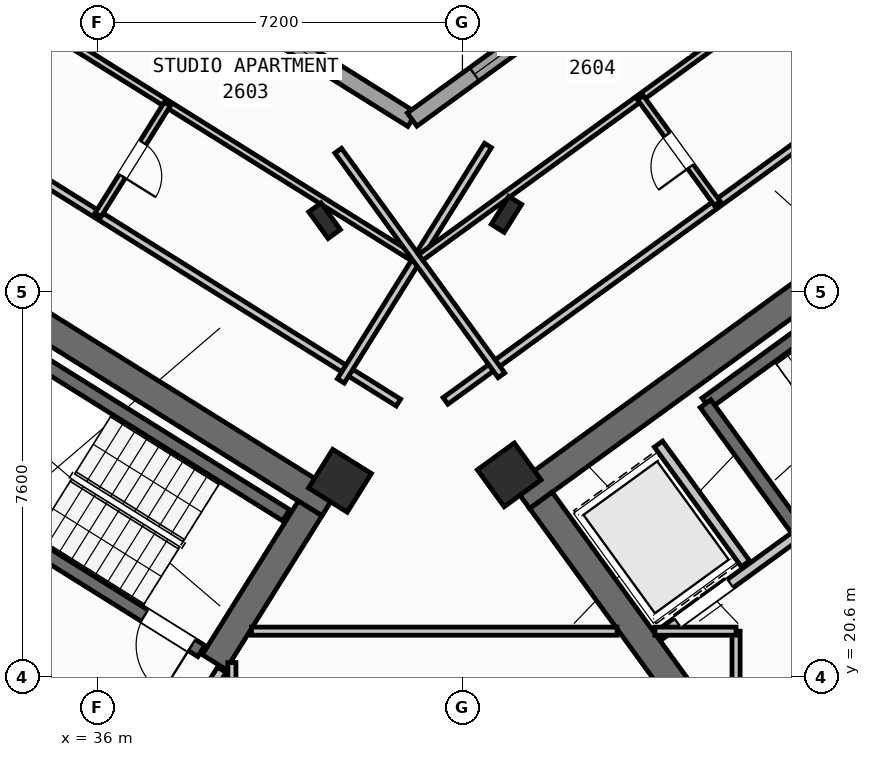
"""IFC4 building model, lengths in metres.
Left out: names, types, materials, properties, quantities, classifications, styles, units other than length and angle.
Written with IfcOpenShell. Run it as: python <this file> out.ifc"""

import sys

from ifc_helpers import new_model, si_unit, direction, frame, frame_2d, origin, origin_2d, place, context, subcontext, project, spatial, rectangle, hollow_rectangle, i_section, extrude, source, transform, mapped, element, fill, save


model = new_model("IFC4")
c1 = context("Model", 3, precision=1e-05, world=origin(), true_north=direction((0.0, 1.0)))
c2 = subcontext(c1, "Body", "Model", "MODEL_VIEW")
j1 = project(units=[si_unit("LENGTHUNIT", "METRE"), si_unit("PLANEANGLEUNIT", "RADIAN")], contexts=[c1])
p1 = place(None, origin())
s1 = spatial("IfcSite", under=j1, at=p1, CompositionType="ELEMENT")
p2 = place(p1, origin())
s2 = spatial("IfcBuilding", under=s1, at=p2, CompositionType="ELEMENT")
p3 = place(p2, frame((0.0, 0.0, 105.3)))
s3 = spatial("IfcBuildingStorey", under=s2, at=p3, CompositionType="ELEMENT", Elevation=105.3)
p4 = place(p3, frame((40.573, 24.01, 0.0), z_axis=(0.0, 0.0, 1.0), x_axis=(-0.848047359947, 0.529920442413, 0.0)))
e1 = element("IfcWall", 1, at=p4, inside=s3, PredefinedType="SHEAR", context=c2, shape_type="SweptSolid", body=[
    extrude(rectangle(XDim=13.14, YDim=0.55, at=frame_2d((6.57, 0.0))), origin(), (0.0, 0.0, 1.0), 3.35),
])
p5 = place(p3, frame((40.194, 23.922, 0.0), z_axis=(0.0, 0.0, 1.0), x_axis=(-0.529888438328, -0.848067357541, 0.0)))
e2 = element("IfcWall", 2, at=p5, inside=s3, PredefinedType="SHEAR", context=c2, shape_type="SweptSolid", body=[
    extrude(rectangle(XDim=3.575, YDim=0.55, at=frame_2d((1.788, 0.0))), origin(), (0.0, 0.0, 1.0), 3.35),
])
p6 = place(p3, frame((44.365, 24.142, 0.0), z_axis=(0.0, 0.0, 1.0), x_axis=(0.809024304885, 0.587775190107, 0.0)))
e3 = element("IfcWall", 3, at=p6, inside=s3, PredefinedType="SHEAR", context=c2, shape_type="SweptSolid", body=[
    extrude(rectangle(XDim=12.34, YDim=0.55, at=frame_2d((6.17, 0.0))), origin(), (0.0, 0.0, 1.0), 3.35),
])
p7 = place(p3, frame((48.526, 18.884, 0.0), z_axis=(0.0, 0.0, 1.0), x_axis=(-0.587764933797, 0.809031756236, 0.0)))
e4 = element("IfcWall", 4, at=p7, inside=s3, PredefinedType="SHEAR", context=c2, shape_type="SweptSolid", body=[
    extrude(rectangle(XDim=6.425, YDim=0.55, at=frame_2d((3.212, 0.0))), origin(), (0.0, 0.0, 1.0), 3.35),
])
m1 = source(origin(), c2, "Body", "SweptSolid", [
    extrude(i_section(OverallWidth=0.3, OverallDepth=0.65, WebThickness=0.016, FlangeThickness=0.031, at=origin_2d()), origin(), (0.0, 0.0, 1.0), 3.6),
])
p8 = place(p3, frame((44.068, 29.726, 0.0), z_axis=(0.0, 0.0, 1.0), x_axis=(-0.848048096156, 0.529919264233, 0.0)))
e5 = element("IfcColumn", 5, at=p8, inside=s3, PredefinedType="COLUMN", context=c2, shape_type="MappedRepresentation", body=[
    mapped(m1, transform((0.0, 0.0, 0.0), scale=1.0)),
])
m2 = source(origin(), c2, "Body", "SweptSolid", [
    extrude(hollow_rectangle(XDim=0.9, YDim=0.9, WallThickness=0.036, at=origin_2d()), origin(), (0.0, 0.0, 1.0), 3.6),
])
for number, where, z_axis, x_axis in (
    (6, (40.783, 24.469, 0.0), (0.0, 0.0, 1.0), (-0.848, 0.53, 0.0)),
    (7, (44.124, 24.585, 0.0), (0.0, 0.0, 1.0), (0.809, 0.588, 0.0)),
):
    element("IfcColumn", number, at=place(p3, frame(where, z_axis=z_axis, x_axis=x_axis)), inside=s3, PredefinedType="COLUMN", context=c2, shape_type="MappedRepresentation", body=[
        mapped(m2, transform((0.0, 0.0, 0.0), scale=1.0)),
    ])
p9 = place(p3, frame((40.479, 29.601, 0.0), z_axis=(0.0, 0.0, 1.0), x_axis=(0.809016994375, 0.587785252292, 0.0)))
e8 = element("IfcColumn", 8, at=p9, inside=s3, PredefinedType="COLUMN", context=c2, shape_type="MappedRepresentation", body=[
    mapped(m1, transform((0.0, 0.0, 0.0), scale=1.0)),
])
p10 = place(p3, frame((17.424, 47.083, 0.0), z_axis=(0.0, 0.0, 1.0), x_axis=(0.848049927979, -0.529916332693, 0.0)))
e9 = element("IfcWall", 9, at=p10, inside=s3, PredefinedType="STANDARD", context=c2, shape_type="SweptSolid", body=[
    extrude(rectangle(XDim=29.223, YDim=0.32, at=frame_2d((14.612, 0.0))), origin(), (0.0, 0.0, 1.0), 3.35),
])
p11 = place(p10, frame((3.709, 0.0, 0.0)))
e10 = element("IfcOpeningElement", 10, at=p11, cuts=e9, PredefinedType="OPENING", context=c2, shape_type="SweptSolid", body=[
    extrude(rectangle(XDim=1.05, YDim=2.15, at=frame_2d((0.525, 1.075))), frame((0.0, 0.17, 0.0), z_axis=(0.0, -1.0, 0.0), x_axis=(1.0, 0.0, 0.0)), (0.0, 0.0, 1.0), 0.34),
])
p12 = place(p10, frame((0.659, 0.0, 0.95)))
e11 = element("IfcOpeningElement", 11, at=p12, cuts=e9, PredefinedType="OPENING", context=c2, shape_type="SweptSolid", body=[
    extrude(rectangle(XDim=1.2, YDim=1.4, at=frame_2d((0.6, 0.7))), frame((0.0, 0.17, 0.0), z_axis=(0.0, -1.0, 0.0), x_axis=(1.0, 0.0, 0.0)), (0.0, 0.0, 1.0), 0.34),
])
p13 = place(p10, frame((6.972, 0.0, 1.0)))
e12 = element("IfcOpeningElement", 12, at=p13, cuts=e9, PredefinedType="OPENING", context=c2, shape_type="SweptSolid", body=[
    extrude(rectangle(XDim=0.9, YDim=1.25, at=frame_2d((0.45, 0.625))), frame((0.0, 0.17, 0.0), z_axis=(0.0, -1.0, 0.0), x_axis=(1.0, 0.0, 0.0)), (0.0, 0.0, 1.0), 0.34),
])
p14 = place(p10, frame((9.847, 0.0, 0.85)))
e13 = element("IfcOpeningElement", 13, at=p14, cuts=e9, PredefinedType="OPENING", context=c2, shape_type="SweptSolid", body=[
    extrude(rectangle(XDim=1.5, YDim=1.5, at=frame_2d((0.75, 0.75))), frame((0.0, 0.17, 0.0), z_axis=(0.0, -1.0, 0.0), x_axis=(1.0, 0.0, 0.0)), (0.0, 0.0, 1.0), 0.34),
])
p15 = place(p10, frame((13.889, 0.0, 0.95)))
e14 = element("IfcOpeningElement", 14, at=p15, cuts=e9, PredefinedType="OPENING", context=c2, shape_type="SweptSolid", body=[
    extrude(rectangle(XDim=1.2, YDim=1.4, at=frame_2d((0.6, 0.7))), frame((0.0, 0.17, 0.0), z_axis=(0.0, -1.0, 0.0), x_axis=(1.0, 0.0, 0.0)), (0.0, 0.0, 1.0), 0.34),
])
p16 = place(p10, frame((17.254, 0.0, 1.0)))
e15 = element("IfcOpeningElement", 15, at=p16, cuts=e9, PredefinedType="OPENING", context=c2, shape_type="SweptSolid", body=[
    extrude(rectangle(XDim=0.9, YDim=1.25, at=frame_2d((0.45, 0.625))), frame((0.0, 0.17, 0.0), z_axis=(0.0, -1.0, 0.0), x_axis=(1.0, 0.0, 0.0)), (0.0, 0.0, 1.0), 0.34),
])
p17 = place(p10, frame((20.764, 0.0, 0.8)))
e16 = element("IfcOpeningElement", 16, at=p17, cuts=e9, PredefinedType="OPENING", context=c2, shape_type="SweptSolid", body=[
    extrude(rectangle(XDim=2.1, YDim=1.55, at=frame_2d((1.05, 0.775))), frame((0.0, 0.17, 0.0), z_axis=(0.0, -1.0, 0.0), x_axis=(1.0, 0.0, 0.0)), (0.0, 0.0, 1.0), 0.34),
])
p18 = place(p10, frame((25.403, 0.0, 0.8)))
e17 = element("IfcOpeningElement", 17, at=p18, cuts=e9, PredefinedType="OPENING", context=c2, shape_type="SweptSolid", body=[
    extrude(rectangle(XDim=2.1, YDim=1.55, at=frame_2d((1.05, 0.775))), frame((0.0, 0.17, 0.0), z_axis=(0.0, -1.0, 0.0), x_axis=(1.0, 0.0, 0.0)), (0.0, 0.0, 1.0), 0.34),
])
p19 = place(p3, frame((42.207, 31.597, 0.0), z_axis=(0.0, 0.0, 1.0), x_axis=(0.809020333377, 0.587780656523, 0.0)))
e18 = element("IfcWall", 18, at=p19, inside=s3, PredefinedType="STANDARD", context=c2, shape_type="SweptSolid", body=[
    extrude(rectangle(XDim=15.223, YDim=0.32, at=frame_2d((7.611, 0.0))), origin(), (0.0, 0.0, 1.0), 3.35),
])
p20 = place(p19, frame((12.82, 0.0, 0.0)))
e19 = element("IfcOpeningElement", 19, at=p20, cuts=e18, PredefinedType="OPENING", context=c2, shape_type="SweptSolid", body=[
    extrude(rectangle(XDim=1.05, YDim=2.15, at=frame_2d((0.525, 1.075))), frame((0.0, 0.17, 0.0), z_axis=(0.0, -1.0, 0.0), x_axis=(1.0, 0.0, 0.0)), (0.0, 0.0, 1.0), 0.34),
])
p21 = place(p19, frame((1.52, 0.0, 0.8)))
e20 = element("IfcOpeningElement", 20, at=p21, cuts=e18, PredefinedType="OPENING", context=c2, shape_type="SweptSolid", body=[
    extrude(rectangle(XDim=2.1, YDim=1.55, at=frame_2d((1.05, 0.775))), frame((0.0, 0.17, 0.0), z_axis=(0.0, -1.0, 0.0), x_axis=(1.0, 0.0, 0.0)), (0.0, 0.0, 1.0), 0.34),
])
p22 = place(p19, frame((5.76, 0.0, 0.8)))
e21 = element("IfcOpeningElement", 21, at=p22, cuts=e18, PredefinedType="OPENING", context=c2, shape_type="SweptSolid", body=[
    extrude(rectangle(XDim=2.1, YDim=1.55, at=frame_2d((1.05, 0.775))), frame((0.0, 0.17, 0.0), z_axis=(0.0, -1.0, 0.0), x_axis=(1.0, 0.0, 0.0)), (0.0, 0.0, 1.0), 0.34),
])
p23 = place(p19, frame((10.219, 0.0, 1.0)))
e22 = element("IfcOpeningElement", 22, at=p23, cuts=e18, PredefinedType="OPENING", context=c2, shape_type="SweptSolid", body=[
    extrude(rectangle(XDim=0.9, YDim=1.25, at=frame_2d((0.45, 0.625))), frame((0.0, 0.17, 0.0), z_axis=(0.0, -1.0, 0.0), x_axis=(1.0, 0.0, 0.0)), (0.0, 0.0, 1.0), 0.34),
])
p24 = place(p3, frame((39.721, 23.788, 0.0), z_axis=(0.0, 0.0, 1.0), x_axis=(-0.848054434086, 0.529909121291, 0.0)))
e23 = element("IfcWall", 23, at=p24, inside=s3, PredefinedType="SHEAR", context=c2, shape_type="SweptSolid", body=[
    extrude(rectangle(XDim=7.33, YDim=0.26, at=frame_2d((3.665, 0.0))), origin(), (0.0, 0.0, 1.0), 3.35),
])
p25 = place(p3, frame((38.046, 21.108, 0.0), z_axis=(0.0, 0.0, 1.0), x_axis=(-0.848054434086, 0.529909121291, 0.0)))
e24 = element("IfcWall", 24, at=p25, inside=s3, PredefinedType="SHEAR", context=c2, shape_type="SweptSolid", body=[
    extrude(rectangle(XDim=7.33, YDim=0.26, at=frame_2d((3.665, 0.0))), origin(), (0.0, 0.0, 1.0), 3.35),
])
p26 = place(p25, frame((0.22, 0.0, 0.0)))
e25 = element("IfcOpeningElement", 25, at=p26, cuts=e24, PredefinedType="OPENING", context=c2, shape_type="SweptSolid", body=[
    extrude(rectangle(XDim=1.1, YDim=2.1, at=frame_2d((0.55, 1.05))), frame((0.0, 0.14, 0.0), z_axis=(0.0, -1.0, 0.0), x_axis=(1.0, 0.0, 0.0)), (0.0, 0.0, 1.0), 0.28),
])
p27 = place(p3, frame((36.417, 18.447, 0.0), z_axis=(0.0, 0.0, 1.0), x_axis=(-0.848064879198, 0.529892404805, 0.0)))
e26 = element("IfcWall", 26, at=p27, inside=s3, PredefinedType="STANDARD", context=c2, shape_type="SweptSolid", body=[
    extrude(rectangle(XDim=5.768, YDim=0.2, at=frame_2d((2.884, 0.0))), origin(), (0.0, 0.0, 1.0), 3.34),
])
p28 = place(p27, frame((2.548, 0.0, 0.0)))
e27 = element("IfcOpeningElement", 27, at=p28, cuts=e26, PredefinedType="OPENING", context=c2, shape_type="SweptSolid", body=[
    extrude(rectangle(XDim=1.15, YDim=2.1, at=frame_2d((0.575, 1.05))), frame((0.0, 0.11, 0.0), z_axis=(0.0, -1.0, 0.0), x_axis=(1.0, 0.0, 0.0)), (0.0, 0.0, 1.0), 0.22),
])
p29 = place(p3, frame((48.006, 25.996, 0.0), z_axis=(0.0, 0.0, 1.0), x_axis=(0.80901903764, 0.587782439969, 0.0)))
e28 = element("IfcWall", 28, at=p29, inside=s3, PredefinedType="SHEAR", context=c2, shape_type="SweptSolid", body=[
    extrude(rectangle(XDim=7.46, YDim=0.26, at=frame_2d((3.73, 0.0))), origin(), (0.0, 0.0, 1.0), 3.35),
])
p30 = place(p3, frame((49.855, 23.434, 0.0), z_axis=(0.0, 0.0, 1.0), x_axis=(-0.58776738483, 0.809029975545, 0.0)))
e29 = element("IfcWall", 29, at=p30, inside=s3, PredefinedType="SHEAR", context=c2, shape_type="SweptSolid", body=[
    extrude(rectangle(XDim=3.16, YDim=0.26, at=frame_2d((1.58, 0.0))), origin(), (0.0, 0.0, 1.0), 3.35),
])
p31 = place(p3, frame((47.065, 21.407, 0.0), z_axis=(0.0, 0.0, 1.0), x_axis=(0.809032984992, 0.587763242466, 0.0)))
e30 = element("IfcWall", 30, at=p31, inside=s3, PredefinedType="STANDARD", context=c2, shape_type="SweptSolid", body=[
    extrude(rectangle(XDim=3.448, YDim=0.2, at=frame_2d((1.724, 0.0))), origin(), (0.0, 0.0, 1.0), 3.34),
])
p32 = place(p31, frame((0.458, 0.0, 0.0)))
e31 = element("IfcOpeningElement", 31, at=p32, cuts=e30, PredefinedType="OPENING", context=c2, shape_type="SweptSolid", body=[
    extrude(rectangle(XDim=1.3, YDim=2.2, at=frame_2d((0.65, 1.1))), frame((0.0, 0.11, 0.0), z_axis=(0.0, -1.0, 0.0), x_axis=(1.0, 0.0, 0.0)), (0.0, 0.0, 1.0), 0.22),
])
p33 = place(p3, frame((48.758, 19.077, 0.0), z_axis=(0.0, 0.0, 1.0), x_axis=(0.809005065155, 0.587801671104, 0.0)))
e32 = element("IfcWall", 32, at=p33, inside=s3, PredefinedType="STANDARD", context=c2, shape_type="SweptSolid", body=[
    extrude(rectangle(XDim=5.768, YDim=0.2, at=frame_2d((2.884, 0.0))), origin(), (0.0, 0.0, 1.0), 3.34),
])
p34 = place(p33, frame((2.548, 0.0, 0.0)))
e33 = element("IfcOpeningElement", 33, at=p34, cuts=e32, PredefinedType="OPENING", context=c2, shape_type="SweptSolid", body=[
    extrude(rectangle(XDim=1.15, YDim=2.1, at=frame_2d((0.575, 1.05))), frame((0.0, 0.11, 0.0), z_axis=(0.0, -1.0, 0.0), x_axis=(1.0, 0.0, 0.0)), (0.0, 0.0, 1.0), 0.22),
])
p35 = place(p3, frame((48.786, 22.83, 0.0), z_axis=(0.0, 0.0, 1.0), x_axis=(-0.587783856777, 0.809018008275, 0.0)))
e34 = element("IfcWall", 34, at=p35, inside=s3, PredefinedType="STANDARD", context=c2, shape_type="SweptSolid", body=[
    extrude(rectangle(XDim=2.92, YDim=0.2, at=frame_2d((1.46, 0.0))), origin(), (0.0, 0.0, 1.0), 3.34),
])
p36 = place(p3, frame((41.936, 26.012, 0.0), z_axis=(0.0, 0.0, 1.0), x_axis=(-0.848051154596, 0.529914369676, 0.0)))
e35 = element("IfcWall", 35, at=p36, inside=s3, PredefinedType="PARTITIONING", context=c2, shape_type="SweptSolid", body=[
    extrude(rectangle(XDim=15.57, YDim=0.16, at=frame_2d((7.785, 0.0))), origin(), (0.0, 0.0, 1.0), 3.34),
])
p37 = place(p36, frame((10.83, 0.0, 0.0)))
e36 = element("IfcOpeningElement", 36, at=p37, cuts=e35, PredefinedType="OPENING", context=c2, shape_type="SweptSolid", body=[
    extrude(rectangle(XDim=1.0, YDim=2.1, at=frame_2d((0.5, 1.05))), frame((0.0, 0.09, 0.0), z_axis=(0.0, -1.0, 0.0), x_axis=(1.0, 0.0, 0.0)), (0.0, 0.0, 1.0), 0.18),
])
p38 = place(p3, frame((43.704, 31.086, 0.0), z_axis=(0.0, 0.0, 1.0), x_axis=(-0.529906828443, -0.848055866774, 0.0)))
e37 = element("IfcWall", 37, at=p38, inside=s3, PredefinedType="PARTITIONING", context=c2, shape_type="SweptSolid", body=[
    extrude(rectangle(XDim=5.48, YDim=0.16, at=frame_2d((2.74, 0.0))), origin(), (0.0, 0.0, 1.0), 3.34),
])
p39 = place(p3, frame((42.226, 28.873, 0.0), z_axis=(0.0, 0.0, 1.0), x_axis=(-0.848049134363, 0.529917602752, 0.0)))
e38 = element("IfcWall", 38, at=p39, inside=s3, PredefinedType="PLUMBINGWALL", context=c2, shape_type="SweptSolid", body=[
    extrude(rectangle(XDim=14.3, YDim=0.14, at=frame_2d((7.15, 0.0))), origin(), (0.0, 0.0, 1.0), 3.34),
])
p40 = place(p39, frame((9.57, 0.0, 0.0)))
e39 = element("IfcOpeningElement", 39, at=p40, cuts=e38, PredefinedType="OPENING", context=c2, shape_type="SweptSolid", body=[
    extrude(rectangle(XDim=0.92, YDim=2.08, at=frame_2d((0.46, 1.04))), frame((0.0, 0.08, 0.0), z_axis=(0.0, -1.0, 0.0), x_axis=(1.0, 0.0, 0.0)), (0.0, 0.0, 1.0), 0.16),
])
p41 = place(p3, frame((37.375, 31.904, 0.0), z_axis=(0.0, 0.0, 1.0), x_axis=(-0.529913878929, -0.848051461244, 0.0)))
e40 = element("IfcWall", 40, at=p41, inside=s3, PredefinedType="PLUMBINGWALL", context=c2, shape_type="SweptSolid", body=[
    extrude(rectangle(XDim=2.58, YDim=0.14, at=frame_2d((1.29, 0.0))), origin(), (0.0, 0.0, 1.0), 3.34),
])
p42 = place(p41, frame((0.9, 0.0, 0.0)))
e41 = element("IfcOpeningElement", 41, at=p42, cuts=e40, PredefinedType="OPENING", context=c2, shape_type="SweptSolid", body=[
    extrude(rectangle(XDim=0.78, YDim=2.05, at=frame_2d((0.39, 1.025))), frame((0.0, 0.08, 0.0), z_axis=(0.0, -1.0, 0.0), x_axis=(1.0, 0.0, 0.0)), (0.0, 0.0, 1.0), 0.16),
])
p43 = place(p3, frame((38.451, 20.737, 0.0), z_axis=(0.0, 0.0, 1.0), x_axis=(-0.529924799939, -0.848044637038, 0.0)))
e42 = element("IfcWall", 42, at=p43, inside=s3, PredefinedType="STANDARD", context=c2, shape_type="SweptSolid", body=[
    extrude(rectangle(XDim=2.96, YDim=0.2, at=frame_2d((1.48, 0.0))), origin(), (0.0, 0.0, 1.0), 3.34),
])
p44 = place(p43, frame((1.46, 0.0, 0.0)))
e43 = element("IfcOpeningElement", 43, at=p44, cuts=e42, PredefinedType="OPENING", context=c2, shape_type="SweptSolid", body=[
    extrude(rectangle(XDim=0.86, YDim=2.05, at=frame_2d((0.43, 1.025))), frame((0.0, 0.11, 0.0), z_axis=(0.0, -1.0, 0.0), x_axis=(1.0, 0.0, 0.0)), (0.0, 0.0, 1.0), 0.22),
])
p45 = place(p3, frame((38.65, 17.93, 0.0), z_axis=(0.0, 0.0, 1.0), x_axis=(0.0, 1.0, 0.0)))
e44 = element("IfcWall", 44, at=p45, inside=s3, PredefinedType="PARTITIONING", context=c2, shape_type="SweptSolid", body=[
    extrude(rectangle(XDim=2.951, YDim=0.16, at=frame_2d((1.476, 0.0))), origin(), (0.0, 0.0, 1.0), 3.34),
])
p46 = place(p3, frame((48.6, 19.295, 0.0), z_axis=(0.0, 0.0, 1.0), x_axis=(0.0, 1.0, 0.0)))
e45 = element("IfcWall", 45, at=p46, inside=s3, PredefinedType="PARTITIONING", context=c2, shape_type="SweptSolid", body=[
    extrude(rectangle(XDim=2.205, YDim=0.16, at=frame_2d((1.103, 0.0))), origin(), (0.0, 0.0, 1.0), 3.34),
])
p47 = place(p3, frame((39.037, 21.5, 0.0), z_axis=(0.0, 0.0, 1.0), x_axis=(1.0, 0.0, 0.0)))
e46 = element("IfcWall", 46, at=p47, inside=s3, PredefinedType="PARTITIONING", context=c2, shape_type="SweptSolid", body=[
    extrude(rectangle(XDim=7.215, YDim=0.16, at=frame_2d((3.607, 0.0))), origin(), (0.0, 0.0, 1.0), 3.34),
])
p48 = place(p3, frame((46.998, 21.5, 0.0), z_axis=(0.0, 0.0, 1.0), x_axis=(1.0, 0.0, 0.0)))
e47 = element("IfcWall", 47, at=p48, inside=s3, PredefinedType="PARTITIONING", context=c2, shape_type="SweptSolid", body=[
    extrude(rectangle(XDim=1.602, YDim=0.16, at=frame_2d((0.801, 0.0))), origin(), (0.0, 0.0, 1.0), 3.34),
])
p49 = place(p3, frame((42.866, 26.044, 0.0), z_axis=(0.0, 0.0, 1.0), x_axis=(0.809020254154, 0.587780765566, 0.0)))
e48 = element("IfcWall", 48, at=p49, inside=s3, PredefinedType="PARTITIONING", context=c2, shape_type="SweptSolid", body=[
    extrude(rectangle(XDim=14.67, YDim=0.16, at=frame_2d((7.335, 0.0))), origin(), (0.0, 0.0, 1.0), 3.34),
])
p50 = place(p49, frame((10.2, 0.0, 0.0)))
e49 = element("IfcOpeningElement", 49, at=p50, cuts=e48, PredefinedType="OPENING", context=c2, shape_type="SweptSolid", body=[
    extrude(rectangle(XDim=1.0, YDim=2.1, at=frame_2d((0.5, 1.05))), frame((0.0, 0.09, 0.0), z_axis=(0.0, -1.0, 0.0), x_axis=(1.0, 0.0, 0.0)), (0.0, 0.0, 1.0), 0.18),
])
p51 = place(p3, frame((43.969, 26.55, 0.0), z_axis=(0.0, 0.0, 1.0), x_axis=(-0.587776919386, 0.80902304852, 0.0)))
e50 = element("IfcWall", 50, at=p51, inside=s3, PredefinedType="PARTITIONING", context=c2, shape_type="SweptSolid", body=[
    extrude(rectangle(XDim=5.48, YDim=0.16, at=frame_2d((2.74, 0.0))), origin(), (0.0, 0.0, 1.0), 3.34),
])
p52 = place(p3, frame((42.377, 28.878, 0.0), z_axis=(0.0, 0.0, 1.0), x_axis=(0.809020411523, 0.587780548963, 0.0)))
e51 = element("IfcWall", 51, at=p52, inside=s3, PredefinedType="PLUMBINGWALL", context=c2, shape_type="SweptSolid", body=[
    extrude(rectangle(XDim=13.4, YDim=0.14, at=frame_2d((6.7, 0.0))), origin(), (0.0, 0.0, 1.0), 3.34),
])
p53 = place(p52, frame((8.94, 0.0, 0.0)))
e52 = element("IfcOpeningElement", 52, at=p53, cuts=e51, PredefinedType="OPENING", context=c2, shape_type="SweptSolid", body=[
    extrude(rectangle(XDim=0.92, YDim=2.08, at=frame_2d((0.46, 1.04))), frame((0.0, 0.08, 0.0), z_axis=(0.0, -1.0, 0.0), x_axis=(1.0, 0.0, 0.0)), (0.0, 0.0, 1.0), 0.16),
])
p54 = place(p3, frame((48.229, 29.941, 0.0), z_axis=(0.0, 0.0, 1.0), x_axis=(-0.587772116736, 0.809026537752, 0.0)))
e53 = element("IfcWall", 53, at=p54, inside=s3, PredefinedType="PLUMBINGWALL", context=c2, shape_type="SweptSolid", body=[
    extrude(rectangle(XDim=2.58, YDim=0.14, at=frame_2d((1.29, 0.0))), origin(), (0.0, 0.0, 1.0), 3.34),
])
p55 = place(p54, frame((0.9, 0.0, 0.0)))
e54 = element("IfcOpeningElement", 54, at=p55, cuts=e53, PredefinedType="OPENING", context=c2, shape_type="SweptSolid", body=[
    extrude(rectangle(XDim=0.78, YDim=2.05, at=frame_2d((0.39, 1.025))), frame((0.0, 0.08, 0.0), z_axis=(0.0, -1.0, 0.0), x_axis=(1.0, 0.0, 0.0)), (0.0, 0.0, 1.0), 0.16),
])
m3 = source(origin(), c2, "Body", "SweptSolid", [
    extrude(rectangle(XDim=2.1, YDim=1.55, at=frame_2d((1.05, 0.775))), frame((0.0, 0.03, 0.0), z_axis=(0.0, -1.0, 0.0), x_axis=(1.0, 0.0, 0.0)), (0.0, 0.0, 1.0), 0.06),
])
p56 = place(p18, origin())
e55 = element("IfcWindow", 55, at=p56, inside=s3, PartitioningType="SINGLE_PANEL", PredefinedType="WINDOW", context=c2, shape_type="MappedRepresentation", body=[
    mapped(m3, transform((0.0, 0.0, 0.0), scale=1.0)),
])
fill(e17, e55)
p57 = place(p21, origin())
e56 = element("IfcWindow", 56, at=p57, inside=s3, PartitioningType="SINGLE_PANEL", PredefinedType="WINDOW", context=c2, shape_type="MappedRepresentation", body=[
    mapped(m3, transform((0.0, 0.0, 0.0), scale=1.0)),
])
fill(e20, e56)
m4 = source(origin(), c2, "Body", "SweptSolid", [
    extrude(rectangle(XDim=1.1, YDim=2.1, at=frame_2d((0.55, 1.05))), frame((0.0, 0.025, 0.0), z_axis=(0.0, -1.0, 0.0), x_axis=(1.0, 0.0, 0.0)), (0.0, 0.0, 1.0), 0.05),
])
p58 = place(p26, origin())
e57 = element("IfcDoor", 57, at=p58, inside=s3, OperationType="SINGLE_SWING_LEFT", PredefinedType="DOOR", context=c2, shape_type="MappedRepresentation", body=[
    mapped(m4, transform((0.0, 0.0, 0.0), scale=1.0)),
])
fill(e25, e57)
m5 = source(origin(), c2, "Body", "SweptSolid", [
    extrude(rectangle(XDim=1.3, YDim=2.2, at=frame_2d((0.65, 1.1))), frame((0.0, 0.025, 0.0), z_axis=(0.0, -1.0, 0.0), x_axis=(1.0, 0.0, 0.0)), (0.0, 0.0, 1.0), 0.05),
])
p59 = place(p32, origin())
e58 = element("IfcDoor", 58, at=p59, inside=s3, OperationType="DOUBLE_DOOR_SLIDING", PredefinedType="DOOR", context=c2, shape_type="MappedRepresentation", body=[
    mapped(m5, transform((0.0, 0.0, 0.0), scale=1.0)),
])
fill(e31, e58)
m6 = source(origin(), c2, "Body", "SweptSolid", [
    extrude(rectangle(XDim=0.78, YDim=2.05, at=frame_2d((0.39, 1.025))), frame((0.0, 0.025, 0.0), z_axis=(0.0, -1.0, 0.0), x_axis=(1.0, 0.0, 0.0)), (0.0, 0.0, 1.0), 0.05),
])
p60 = place(p42, origin())
e59 = element("IfcDoor", 59, at=p60, inside=s3, OperationType="SINGLE_SWING_RIGHT", PredefinedType="DOOR", context=c2, shape_type="MappedRepresentation", body=[
    mapped(m6, transform((0.0, 0.0, 0.0), scale=1.0)),
])
fill(e41, e59)
p61 = place(p55, origin())
e60 = element("IfcDoor", 60, at=p61, inside=s3, OperationType="SINGLE_SWING_LEFT", PredefinedType="DOOR", context=c2, shape_type="MappedRepresentation", body=[
    mapped(m6, transform((0.0, 0.0, 0.0), scale=1.0)),
])
fill(e54, e60)
save(model, sys.argv[1])
